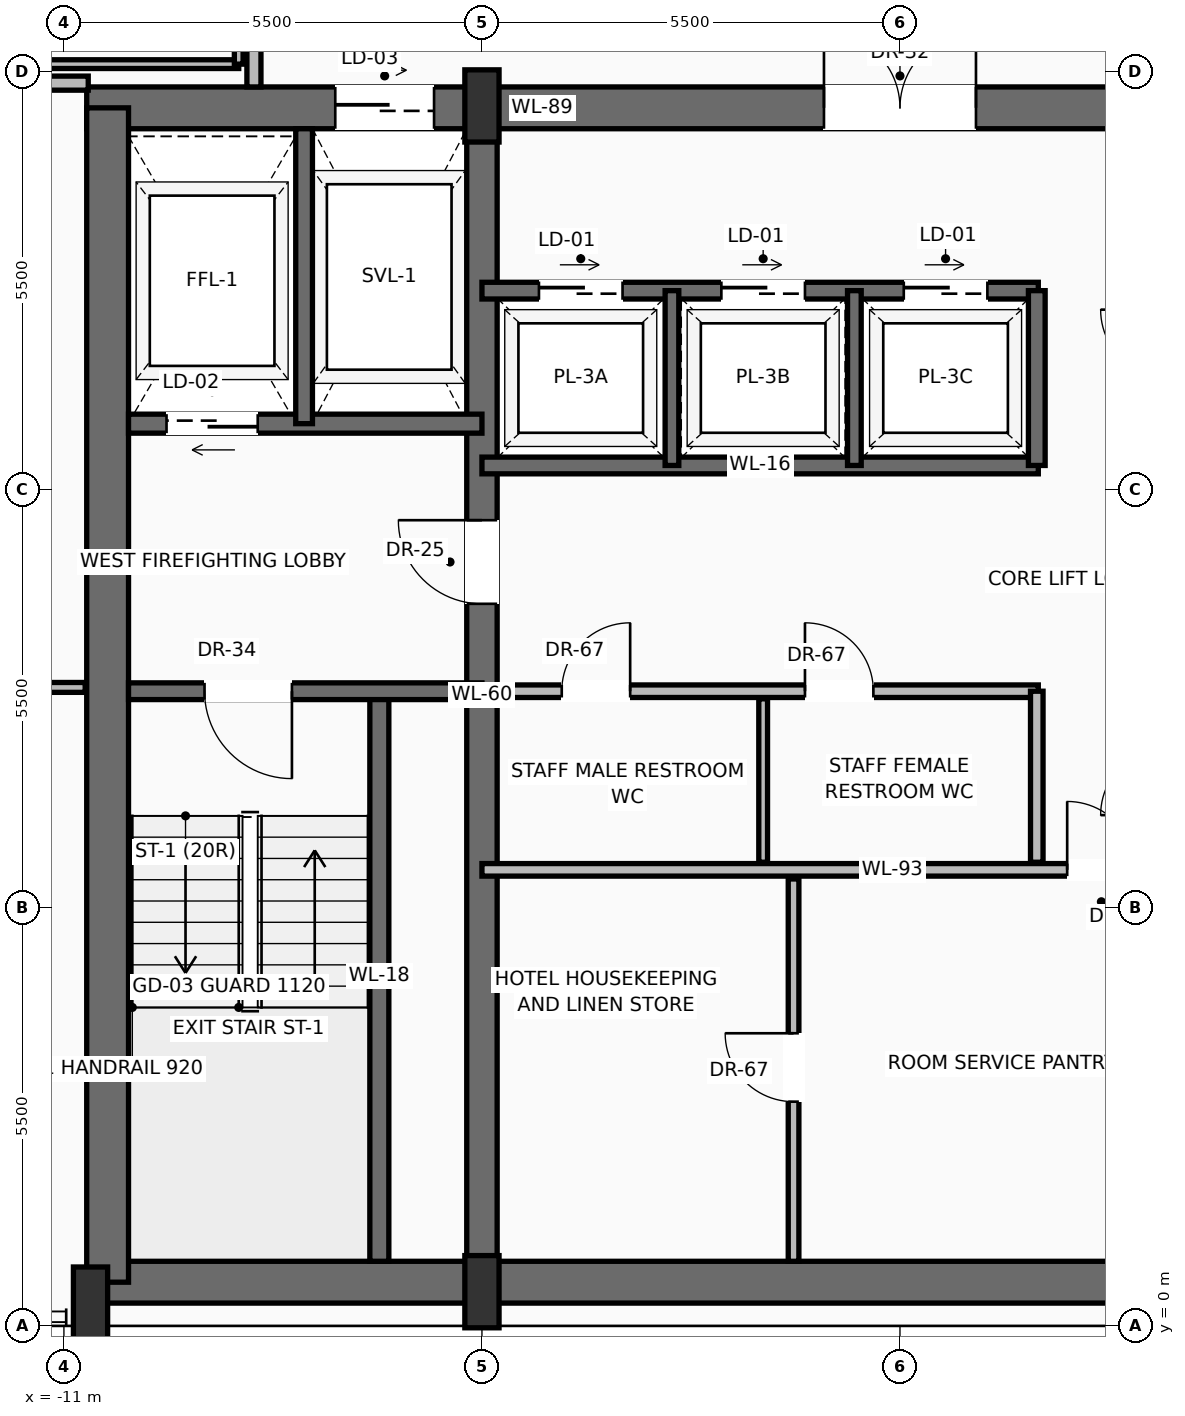
"""IFC4 building model, lengths in metres.
Left out: names, types, materials, properties, quantities, classifications, styles, units other than length and angle.
Written with IfcOpenShell. Run it as: python <this file> out.ifc"""

import sys

from ifc_helpers import new_model, si_unit, direction, frame, frame_2d, origin, origin_2d, place, context, subcontext, project, spatial, rectangle, extrude, source, transform, mapped, element, fill, save


model = new_model("IFC4")
c1 = context("Model", 3, precision=1e-05, world=origin(), true_north=direction((0.0, 1.0)))
c2 = subcontext(c1, "Body", "Model", "MODEL_VIEW")
j1 = project(units=[si_unit("LENGTHUNIT", "METRE"), si_unit("PLANEANGLEUNIT", "RADIAN")], contexts=[c1])
p1 = place(None, origin())
s1 = spatial("IfcSite", under=j1, at=p1, CompositionType="ELEMENT")
p2 = place(p1, origin())
s2 = spatial("IfcBuilding", under=s1, at=p2, CompositionType="ELEMENT")
p3 = place(p2, frame((0.0, 0.0, 226.9)))
s3 = spatial("IfcBuildingStorey", under=s2, at=p3, CompositionType="ELEMENT", Elevation=226.9)
p4 = place(p3, frame((-10.65, 0.575, 0.0), z_axis=(0.0, 0.0, 1.0), x_axis=(1.0, 0.0, 0.0)))
e1 = element("IfcWall", 1, at=p4, inside=s3, PredefinedType="SHEAR", context=c2, shape_type="SweptSolid", body=[
    extrude(rectangle(XDim=21.3, YDim=0.55, at=frame_2d((10.65, 0.0))), origin(), (0.0, 0.0, 1.0), 3.24),
])
p5 = place(p3, frame((-10.7, 16.025, 0.0), z_axis=(0.0, 0.0, 1.0), x_axis=(1.0, 0.0, 0.0)))
e2 = element("IfcWall", 2, at=p5, inside=s3, PredefinedType="SHEAR", context=c2, shape_type="SweptSolid", body=[
    extrude(rectangle(XDim=21.4, YDim=0.55, at=frame_2d((10.7, 0.0))), origin(), (0.0, 0.0, 1.0), 3.24),
])
p6 = place(p5, frame((3.27, 0.0, 0.0)))
e3 = element("IfcOpeningElement", 3, at=p6, cuts=e2, PredefinedType="OPENING", context=c2, shape_type="SweptSolid", body=[
    extrude(rectangle(XDim=1.3, YDim=2.3, at=frame_2d((0.65, 1.15))), frame((0.0, 0.285, 0.0), z_axis=(0.0, -1.0, 0.0), x_axis=(1.0, 0.0, 0.0)), (0.0, 0.0, 1.0), 0.57),
])
p7 = place(p5, frame((9.7, 0.0, 0.0)))
e4 = element("IfcOpeningElement", 4, at=p7, cuts=e2, PredefinedType="OPENING", context=c2, shape_type="SweptSolid", body=[
    extrude(rectangle(XDim=2.0, YDim=2.4, at=frame_2d((1.0, 1.2))), frame((0.0, 0.285, 0.0), z_axis=(0.0, -1.0, 0.0), x_axis=(1.0, 0.0, 0.0)), (0.0, 0.0, 1.0), 0.57),
])
p8 = place(p3, frame((-10.425, 0.575, 0.0), z_axis=(0.0, 0.0, 1.0), x_axis=(0.0, 1.0, 0.0)))
e5 = element("IfcWall", 5, at=p8, inside=s3, PredefinedType="SHEAR", context=c2, shape_type="SweptSolid", body=[
    extrude(rectangle(XDim=15.45, YDim=0.55, at=frame_2d((7.725, 0.0))), origin(), (0.0, 0.0, 1.0), 3.24),
])
p9 = place(p3, frame((-5.5, 0.575, 0.0), z_axis=(0.0, 0.0, 1.0), x_axis=(0.0, 1.0, 0.0)))
e6 = element("IfcWall", 6, at=p9, inside=s3, PredefinedType="SHEAR", context=c2, shape_type="SweptSolid", body=[
    extrude(rectangle(XDim=15.45, YDim=0.4, at=frame_2d((7.725, 0.0))), origin(), (0.0, 0.0, 1.0), 3.24),
])
p10 = place(p9, frame((8.925, 0.0, 0.0)))
e7 = element("IfcOpeningElement", 7, at=p10, cuts=e6, PredefinedType="OPENING", context=c2, shape_type="SweptSolid", body=[
    extrude(rectangle(XDim=1.1, YDim=2.2, at=frame_2d((0.55, 1.1))), frame((0.0, 0.21, 0.0), z_axis=(0.0, -1.0, 0.0), x_axis=(1.0, 0.0, 0.0)), (0.0, 0.0, 1.0), 0.42),
])
m1 = source(origin(), c2, "Body", "SweptSolid", [
    extrude(rectangle(XDim=0.45, YDim=0.95, at=origin_2d()), origin(), (0.0, 0.0, 1.0), 3.45),
])
for number, where, z_axis, x_axis in (
    (8, (-10.65, 0.3, 0.0), (0.0, 0.0, 1.0), (1.0, 0.0, 0.0)),
    (9, (-5.5, 0.45, 0.0), (0.0, 0.0, 1.0), (1.0, 0.0, 0.0)),
    (10, (-5.5, 16.05, 0.0), (0.0, 0.0, 1.0), (1.0, 0.0, 0.0)),
):
    element("IfcColumn", number, at=place(p3, frame(where, z_axis=z_axis, x_axis=x_axis)), inside=s3, PredefinedType="PILASTER", context=c2, shape_type="MappedRepresentation", body=[
        mapped(m1, transform((0.0, 0.0, 0.0), scale=1.0)),
    ])
p11 = place(p3, frame((-19.662, 15.382, 0.0), z_axis=(0.0, 0.0, 1.0), x_axis=(0.511952859747, 0.859013544361, 0.0)))
e11 = element("IfcWall", 11, at=p11, inside=s3, PredefinedType="SOLIDWALL", context=c2, shape_type="SweptSolid", body=[
    extrude(rectangle(XDim=19.417, YDim=0.28, at=frame_2d((9.708, 0.0))), origin(), (0.0, 0.0, 1.0), 2.82),
])
p12 = place(p11, frame((4.66, 0.0, 0.0)))
e12 = element("IfcOpeningElement", 12, at=p12, cuts=e11, PredefinedType="OPENING", context=c2, shape_type="SweptSolid", body=[
    extrude(rectangle(XDim=1.6, YDim=2.35, at=frame_2d((0.8, 1.175))), frame((0.0, 0.15, 0.0), z_axis=(0.0, -1.0, 0.0), x_axis=(1.0, 0.0, 0.0)), (0.0, 0.0, 1.0), 0.3),
])
p13 = place(p11, frame((13.203, 0.0, 0.9)))
e13 = element("IfcOpeningElement", 13, at=p13, cuts=e11, PredefinedType="OPENING", context=c2, shape_type="SweptSolid", body=[
    extrude(rectangle(XDim=2.0, YDim=1.75, at=frame_2d((1.0, 0.875))), frame((0.0, 0.15, 0.0), z_axis=(0.0, -1.0, 0.0), x_axis=(1.0, 0.0, 0.0)), (0.0, 0.0, 1.0), 0.3),
])
p14 = place(p3, frame((-6.85, 0.85, 0.0), z_axis=(0.0, 0.0, 1.0), x_axis=(0.0, 1.0, 0.0)))
e14 = element("IfcWall", 14, at=p14, inside=s3, PredefinedType="SOLIDWALL", context=c2, shape_type="SweptSolid", body=[
    extrude(rectangle(XDim=7.5, YDim=0.25, at=frame_2d((3.75, 0.0))), origin(), (0.0, 0.0, 1.0), 3.24),
])
p15 = place(p3, frame((-5.5, 8.35, 0.0), z_axis=(0.0, 0.0, 1.0), x_axis=(-1.0, 0.0, 0.0)))
e15 = element("IfcWall", 15, at=p15, inside=s3, PredefinedType="SOLIDWALL", context=c2, shape_type="SweptSolid", body=[
    extrude(rectangle(XDim=4.65, YDim=0.22, at=frame_2d((2.325, 0.0))), origin(), (0.0, 0.0, 1.0), 3.24),
])
p16 = place(p15, frame((2.5, 0.0, 0.0)))
e16 = element("IfcOpeningElement", 16, at=p16, cuts=e15, PredefinedType="OPENING", context=c2, shape_type="SweptSolid", body=[
    extrude(rectangle(XDim=1.15, YDim=2.2, at=frame_2d((0.575, 1.1))), frame((0.0, 0.12, 0.0), z_axis=(0.0, -1.0, 0.0), x_axis=(1.0, 0.0, 0.0)), (0.0, 0.0, 1.0), 0.24),
])
p17 = place(p3, frame((-5.5, 11.87, 0.0), z_axis=(0.0, 0.0, 1.0), x_axis=(-1.0, 0.0, 0.0)))
e17 = element("IfcWall", 17, at=p17, inside=s3, PredefinedType="SOLIDWALL", context=c2, shape_type="SweptSolid", body=[
    extrude(rectangle(XDim=4.65, YDim=0.25, at=frame_2d((2.325, 0.0))), origin(), (0.0, 0.0, 1.0), 3.24),
])
p18 = place(p17, frame((2.95, 0.0, 0.0)))
e18 = element("IfcOpeningElement", 18, at=p18, cuts=e17, PredefinedType="OPENING", context=c2, shape_type="SweptSolid", body=[
    extrude(rectangle(XDim=1.2, YDim=2.25, at=frame_2d((0.6, 1.125))), frame((0.0, 0.135, 0.0), z_axis=(0.0, -1.0, 0.0), x_axis=(1.0, 0.0, 0.0)), (0.0, 0.0, 1.0), 0.27),
])
p19 = place(p3, frame((-7.84, 11.87, 0.0), z_axis=(0.0, 0.0, 1.0), x_axis=(0.0, 1.0, 0.0)))
e19 = element("IfcWall", 19, at=p19, inside=s3, PredefinedType="SOLIDWALL", context=c2, shape_type="SweptSolid", body=[
    extrude(rectangle(XDim=3.88, YDim=0.22, at=frame_2d((1.94, 0.0))), origin(), (0.0, 0.0, 1.0), 3.24),
])
p20 = place(p3, frame((-5.5, 6.0, 0.0), z_axis=(0.0, 0.0, 1.0), x_axis=(1.0, 0.0, 0.0)))
e20 = element("IfcWall", 20, at=p20, inside=s3, PredefinedType="PARTITIONING", context=c2, shape_type="SweptSolid", body=[
    extrude(rectangle(XDim=10.8, YDim=0.165, at=frame_2d((5.4, 0.0))), origin(), (0.0, 0.0, 1.0), 3.232),
])
p21 = place(p20, frame((7.7, 0.0, 0.0)))
e21 = element("IfcOpeningElement", 21, at=p21, cuts=e20, PredefinedType="OPENING", context=c2, shape_type="SweptSolid", body=[
    extrude(rectangle(XDim=0.9, YDim=2.1, at=frame_2d((0.45, 1.05))), frame((0.0, 0.093, 0.0), z_axis=(0.0, -1.0, 0.0), x_axis=(1.0, 0.0, 0.0)), (0.0, 0.0, 1.0), 0.185),
])
p22 = place(p3, frame((-1.4, 0.85, 0.0), z_axis=(0.0, 0.0, 1.0), x_axis=(0.0, 1.0, 0.0)))
e22 = element("IfcWall", 22, at=p22, inside=s3, PredefinedType="PARTITIONING", context=c2, shape_type="SweptSolid", body=[
    extrude(rectangle(XDim=5.03, YDim=0.14, at=frame_2d((2.515, 0.0))), origin(), (0.0, 0.0, 1.0), 3.232),
])
p23 = place(p22, frame((2.1, 0.0, 0.0)))
e23 = element("IfcOpeningElement", 23, at=p23, cuts=e22, PredefinedType="OPENING", context=c2, shape_type="SweptSolid", body=[
    extrude(rectangle(XDim=0.9, YDim=2.1, at=frame_2d((0.45, 1.05))), frame((0.0, 0.08, 0.0), z_axis=(0.0, -1.0, 0.0), x_axis=(1.0, 0.0, 0.0)), (0.0, 0.0, 1.0), 0.16),
])
p24 = place(p3, frame((-5.3, 8.35, 0.0), z_axis=(0.0, 0.0, 1.0), x_axis=(1.0, 0.0, 0.0)))
e24 = element("IfcWall", 24, at=p24, inside=s3, PredefinedType="PARTITIONING", context=c2, shape_type="SweptSolid", body=[
    extrude(rectangle(XDim=7.12, YDim=0.165, at=frame_2d((3.56, 0.0))), origin(), (0.0, 0.0, 1.0), 3.232),
])
p25 = place(p24, frame((0.85, 0.0, 0.0)))
e25 = element("IfcOpeningElement", 25, at=p25, cuts=e24, PredefinedType="OPENING", context=c2, shape_type="SweptSolid", body=[
    extrude(rectangle(XDim=0.9, YDim=2.1, at=frame_2d((0.45, 1.05))), frame((0.0, 0.093, 0.0), z_axis=(0.0, -1.0, 0.0), x_axis=(1.0, 0.0, 0.0)), (0.0, 0.0, 1.0), 0.185),
])
p26 = place(p24, frame((4.05, 0.0, 0.0)))
e26 = element("IfcOpeningElement", 26, at=p26, cuts=e24, PredefinedType="OPENING", context=c2, shape_type="SweptSolid", body=[
    extrude(rectangle(XDim=0.9, YDim=2.1, at=frame_2d((0.45, 1.05))), frame((0.0, 0.093, 0.0), z_axis=(0.0, -1.0, 0.0), x_axis=(1.0, 0.0, 0.0)), (0.0, 0.0, 1.0), 0.185),
])
p27 = place(p3, frame((1.8, 6.1, 0.0), z_axis=(0.0, 0.0, 1.0), x_axis=(0.0, 1.0, 0.0)))
e27 = element("IfcWall", 27, at=p27, inside=s3, PredefinedType="PARTITIONING", context=c2, shape_type="SweptSolid", body=[
    extrude(rectangle(XDim=2.25, YDim=0.165, at=frame_2d((1.125, 0.0))), origin(), (0.0, 0.0, 1.0), 3.232),
])
p28 = place(p3, frame((-1.8, 6.1, 0.0), z_axis=(0.0, 0.0, 1.0), x_axis=(0.0, 1.0, 0.0)))
e28 = element("IfcWall", 28, at=p28, inside=s3, PredefinedType="PARTITIONING", context=c2, shape_type="SweptSolid", body=[
    extrude(rectangle(XDim=2.15, YDim=0.115, at=frame_2d((1.075, 0.0))), origin(), (0.0, 0.0, 1.0), 3.232),
])
p29 = place(p3, frame((-5.5, 11.32, 0.0), z_axis=(0.0, 0.0, 1.0), x_axis=(1.0, 0.0, 0.0)))
e29 = element("IfcWall", 29, at=p29, inside=s3, PredefinedType="SOLIDWALL", context=c2, shape_type="SweptSolid", body=[
    extrude(rectangle(XDim=7.32, YDim=0.22, at=frame_2d((3.66, 0.0))), origin(), (0.0, 0.0, 1.0), 3.24),
])
p30 = place(p3, frame((-5.5, 13.62, 0.0), z_axis=(0.0, 0.0, 1.0), x_axis=(1.0, 0.0, 0.0)))
e30 = element("IfcWall", 30, at=p30, inside=s3, PredefinedType="SOLIDWALL", context=c2, shape_type="SweptSolid", body=[
    extrude(rectangle(XDim=7.32, YDim=0.22, at=frame_2d((3.66, 0.0))), origin(), (0.0, 0.0, 1.0), 3.24),
])
p31 = place(p30, frame((0.75, 0.0, 0.0)))
e31 = element("IfcOpeningElement", 31, at=p31, cuts=e30, PredefinedType="OPENING", context=c2, shape_type="SweptSolid", body=[
    extrude(rectangle(XDim=1.1, YDim=2.2, at=frame_2d((0.55, 1.1))), frame((0.0, 0.12, 0.0), z_axis=(0.0, -1.0, 0.0), x_axis=(1.0, 0.0, 0.0)), (0.0, 0.0, 1.0), 0.24),
])
p32 = place(p30, frame((3.15, 0.0, 0.0)))
e32 = element("IfcOpeningElement", 32, at=p32, cuts=e30, PredefinedType="OPENING", context=c2, shape_type="SweptSolid", body=[
    extrude(rectangle(XDim=1.1, YDim=2.2, at=frame_2d((0.55, 1.1))), frame((0.0, 0.12, 0.0), z_axis=(0.0, -1.0, 0.0), x_axis=(1.0, 0.0, 0.0)), (0.0, 0.0, 1.0), 0.24),
])
p33 = place(p30, frame((5.55, 0.0, 0.0)))
e33 = element("IfcOpeningElement", 33, at=p33, cuts=e30, PredefinedType="OPENING", context=c2, shape_type="SweptSolid", body=[
    extrude(rectangle(XDim=1.1, YDim=2.2, at=frame_2d((0.55, 1.1))), frame((0.0, 0.12, 0.0), z_axis=(0.0, -1.0, 0.0), x_axis=(1.0, 0.0, 0.0)), (0.0, 0.0, 1.0), 0.24),
])
p34 = place(p3, frame((1.8, 11.32, 0.0), z_axis=(0.0, 0.0, 1.0), x_axis=(0.0, 1.0, 0.0)))
e34 = element("IfcWall", 34, at=p34, inside=s3, PredefinedType="SOLIDWALL", context=c2, shape_type="SweptSolid", body=[
    extrude(rectangle(XDim=2.3, YDim=0.22, at=frame_2d((1.15, 0.0))), origin(), (0.0, 0.0, 1.0), 3.24),
])
for number, where, z_axis, x_axis in (
    (35, (-3.0, 11.32, 0.0), (0.0, 0.0, 1.0), (0.0, 1.0, 0.0)),
    (36, (-0.6, 11.32, 0.0), (0.0, 0.0, 1.0), (0.0, 1.0, 0.0)),
):
    element("IfcWall", number, at=place(p3, frame(where, z_axis=z_axis, x_axis=x_axis)), inside=s3, PredefinedType="SOLIDWALL", context=c2, shape_type="SweptSolid", body=[
        extrude(rectangle(XDim=2.3, YDim=0.18, at=frame_2d((1.15, 0.0))), origin(), (0.0, 0.0, 1.0), 3.24),
    ])
p35 = place(p3, frame((-8.5, 16.3, 0.0), z_axis=(0.0, 0.0, 1.0), x_axis=(0.0, 1.0, 0.0)))
e37 = element("IfcWall", 37, at=p35, inside=s3, PredefinedType="PARTITIONING", context=c2, shape_type="SweptSolid", body=[
    extrude(rectangle(XDim=13.3, YDim=0.185, at=frame_2d((6.65, 0.0))), origin(), (0.0, 0.0, 1.0), 3.232),
])
p36 = place(p35, frame((3.136, 0.0, 0.0)))
e38 = element("IfcOpeningElement", 38, at=p36, cuts=e37, PredefinedType="OPENING", context=c2, shape_type="SweptSolid", body=[
    extrude(rectangle(XDim=1.05, YDim=2.25, at=frame_2d((0.525, 1.125))), frame((0.0, 0.103, 0.0), z_axis=(0.0, -1.0, 0.0), x_axis=(1.0, 0.0, 0.0)), (0.0, 0.0, 1.0), 0.205),
])
p37 = place(p35, frame((9.256, 0.0, 0.0)))
e39 = element("IfcOpeningElement", 39, at=p37, cuts=e37, PredefinedType="OPENING", context=c2, shape_type="SweptSolid", body=[
    extrude(rectangle(XDim=1.05, YDim=2.25, at=frame_2d((0.525, 1.125))), frame((0.0, 0.103, 0.0), z_axis=(0.0, -1.0, 0.0), x_axis=(1.0, 0.0, 0.0)), (0.0, 0.0, 1.0), 0.205),
])
p38 = place(p3, frame((-19.236, 16.35, 0.0), z_axis=(0.0, 0.0, 1.0), x_axis=(1.0, 0.0, 0.0)))
e40 = element("IfcWall", 40, at=p38, inside=s3, PredefinedType="PARTITIONING", context=c2, shape_type="SweptSolid", body=[
    extrude(rectangle(XDim=8.556, YDim=0.185, at=frame_2d((4.278, 0.0))), origin(), (0.0, 0.0, 1.0), 3.232),
])
p39 = place(p38, frame((4.935, 0.0, 0.0)))
e41 = element("IfcOpeningElement", 41, at=p39, cuts=e40, PredefinedType="OPENING", context=c2, shape_type="SweptSolid", body=[
    extrude(rectangle(XDim=1.05, YDim=2.25, at=frame_2d((0.525, 1.125))), frame((0.0, 0.103, 0.0), z_axis=(0.0, -1.0, 0.0), x_axis=(1.0, 0.0, 0.0)), (0.0, 0.0, 1.0), 0.205),
])
p40 = place(p3, frame((-23.974, 8.4, 0.0), z_axis=(0.0, 0.0, 1.0), x_axis=(1.0, 0.0, 0.0)))
e42 = element("IfcWall", 42, at=p40, inside=s3, PredefinedType="PARTITIONING", context=c2, shape_type="SweptSolid", body=[
    extrude(rectangle(XDim=13.254, YDim=0.13, at=frame_2d((6.627, 0.0))), origin(), (0.0, 0.0, 1.0), 3.232),
])
p41 = place(p40, frame((5.523, 0.0, 0.0)))
e43 = element("IfcOpeningElement", 43, at=p41, cuts=e42, PredefinedType="OPENING", context=c2, shape_type="SweptSolid", body=[
    extrude(rectangle(XDim=0.95, YDim=2.2, at=frame_2d((0.475, 1.1))), frame((0.0, 0.075, 0.0), z_axis=(0.0, -1.0, 0.0), x_axis=(1.0, 0.0, 0.0)), (0.0, 0.0, 1.0), 0.15),
])
p42 = place(p3, frame((-11.35, 16.6, 0.0), z_axis=(0.0, 0.0, 1.0), x_axis=(1.0, 0.0, 0.0)))
e44 = element("IfcWall", 44, at=p42, inside=s3, PredefinedType="PARTITIONING", context=c2, shape_type="SweptSolid", body=[
    extrude(rectangle(XDim=2.65, YDim=0.115, at=frame_2d((1.325, 0.0))), origin(), (0.0, 0.0, 1.0), 3.232),
])
p43 = place(p3, frame((-8.7, 16.6, 0.0), z_axis=(0.0, 0.0, 1.0), x_axis=(0.0, 1.0, 0.0)))
e45 = element("IfcWall", 45, at=p43, inside=s3, PredefinedType="PARTITIONING", context=c2, shape_type="SweptSolid", body=[
    extrude(rectangle(XDim=2.4, YDim=0.115, at=frame_2d((1.2, 0.0))), origin(), (0.0, 0.0, 1.0), 3.232),
])
m2 = source(origin(), c2, "Body", "SweptSolid", [
    extrude(rectangle(XDim=1.15, YDim=2.2, at=frame_2d((0.575, 1.1))), frame((0.0, 0.025, 0.0), z_axis=(0.0, -1.0, 0.0), x_axis=(1.0, 0.0, 0.0)), (0.0, 0.0, 1.0), 0.05),
])
p44 = place(p16, origin())
e46 = element("IfcDoor", 46, at=p44, inside=s3, OperationType="SINGLE_SWING_LEFT", PredefinedType="DOOR", context=c2, shape_type="MappedRepresentation", body=[
    mapped(m2, transform((0.0, 0.0, 0.0), scale=1.0)),
])
fill(e16, e46)
m3 = source(origin(), c2, "Body", "SweptSolid", [
    extrude(rectangle(XDim=1.1, YDim=2.2, at=frame_2d((0.55, 1.1))), frame((0.0, 0.025, 0.0), z_axis=(0.0, -1.0, 0.0), x_axis=(1.0, 0.0, 0.0)), (0.0, 0.0, 1.0), 0.05),
])
p45 = place(p10, origin())
e47 = element("IfcDoor", 47, at=p45, inside=s3, OperationType="SINGLE_SWING_RIGHT", PredefinedType="DOOR", context=c2, shape_type="MappedRepresentation", body=[
    mapped(m3, transform((0.0, 0.0, 0.0), scale=1.0)),
])
fill(e7, e47)
m4 = source(origin(), c2, "Body", "SweptSolid", [
    extrude(rectangle(XDim=1.2, YDim=2.25, at=frame_2d((0.6, 1.125))), frame((0.0, 0.025, 0.0), z_axis=(0.0, -1.0, 0.0), x_axis=(1.0, 0.0, 0.0)), (0.0, 0.0, 1.0), 0.05),
])
p46 = place(p18, origin())
e48 = element("IfcDoor", 48, at=p46, inside=s3, OperationType="SLIDING_TO_LEFT", PredefinedType="DOOR", context=c2, shape_type="MappedRepresentation", body=[
    mapped(m4, transform((0.0, 0.0, 0.0), scale=1.0)),
])
fill(e18, e48)
m5 = source(origin(), c2, "Body", "SweptSolid", [
    extrude(rectangle(XDim=1.3, YDim=2.3, at=frame_2d((0.65, 1.15))), frame((0.0, 0.025, 0.0), z_axis=(0.0, -1.0, 0.0), x_axis=(1.0, 0.0, 0.0)), (0.0, 0.0, 1.0), 0.05),
])
p47 = place(p6, origin())
e49 = element("IfcDoor", 49, at=p47, inside=s3, OperationType="SLIDING_TO_RIGHT", PredefinedType="DOOR", context=c2, shape_type="MappedRepresentation", body=[
    mapped(m5, transform((0.0, 0.0, 0.0), scale=1.0)),
])
fill(e3, e49)
m6 = source(origin(), c2, "Body", "SweptSolid", [
    extrude(rectangle(XDim=2.0, YDim=2.4, at=frame_2d((1.0, 1.2))), frame((0.0, 0.025, 0.0), z_axis=(0.0, -1.0, 0.0), x_axis=(1.0, 0.0, 0.0)), (0.0, 0.0, 1.0), 0.05),
])
p48 = place(p7, origin())
e50 = element("IfcDoor", 50, at=p48, inside=s3, OperationType="DOUBLE_DOOR_SINGLE_SWING", PredefinedType="DOOR", context=c2, shape_type="MappedRepresentation", body=[
    mapped(m6, transform((0.0, 0.0, 0.0), scale=1.0)),
])
fill(e4, e50)
m7 = source(origin(), c2, "Body", "SweptSolid", [
    extrude(rectangle(XDim=0.9, YDim=2.1, at=frame_2d((0.45, 1.05))), frame((0.0, 0.025, 0.0), z_axis=(0.0, -1.0, 0.0), x_axis=(1.0, 0.0, 0.0)), (0.0, 0.0, 1.0), 0.05),
])
p49 = place(p21, origin())
e51 = element("IfcDoor", 51, at=p49, inside=s3, OperationType="SINGLE_SWING_LEFT", PredefinedType="DOOR", context=c2, shape_type="MappedRepresentation", body=[
    mapped(m7, transform((0.0, 0.0, 0.0), scale=1.0)),
])
fill(e21, e51)
p50 = place(p23, origin())
e52 = element("IfcDoor", 52, at=p50, inside=s3, OperationType="SINGLE_SWING_RIGHT", PredefinedType="DOOR", context=c2, shape_type="MappedRepresentation", body=[
    mapped(m7, transform((0.0, 0.0, 0.0), scale=1.0)),
])
fill(e23, e52)
p51 = place(p25, origin())
e53 = element("IfcDoor", 53, at=p51, inside=s3, OperationType="SINGLE_SWING_RIGHT", PredefinedType="DOOR", context=c2, shape_type="MappedRepresentation", body=[
    mapped(m7, transform((0.0, 0.0, 0.0), scale=1.0)),
])
fill(e25, e53)
p52 = place(p26, origin())
e54 = element("IfcDoor", 54, at=p52, inside=s3, OperationType="SINGLE_SWING_LEFT", PredefinedType="DOOR", context=c2, shape_type="MappedRepresentation", body=[
    mapped(m7, transform((0.0, 0.0, 0.0), scale=1.0)),
])
fill(e26, e54)
m8 = source(origin(), c2, "Body", "SweptSolid", [
    extrude(rectangle(XDim=1.1, YDim=2.2, at=frame_2d((0.55, 1.1))), frame((0.0, 0.025, 0.0), z_axis=(0.0, -1.0, 0.0), x_axis=(1.0, 0.0, 0.0)), (0.0, 0.0, 1.0), 0.05),
])
p53 = place(p31, origin())
e55 = element("IfcDoor", 55, at=p53, inside=s3, OperationType="SLIDING_TO_RIGHT", PredefinedType="DOOR", context=c2, shape_type="MappedRepresentation", body=[
    mapped(m8, transform((0.0, 0.0, 0.0), scale=1.0)),
])
fill(e31, e55)
p54 = place(p32, origin())
e56 = element("IfcDoor", 56, at=p54, inside=s3, OperationType="SLIDING_TO_RIGHT", PredefinedType="DOOR", context=c2, shape_type="MappedRepresentation", body=[
    mapped(m8, transform((0.0, 0.0, 0.0), scale=1.0)),
])
fill(e32, e56)
p55 = place(p33, origin())
e57 = element("IfcDoor", 57, at=p55, inside=s3, OperationType="SLIDING_TO_RIGHT", PredefinedType="DOOR", context=c2, shape_type="MappedRepresentation", body=[
    mapped(m8, transform((0.0, 0.0, 0.0), scale=1.0)),
])
fill(e33, e57)
save(model, sys.argv[1])
